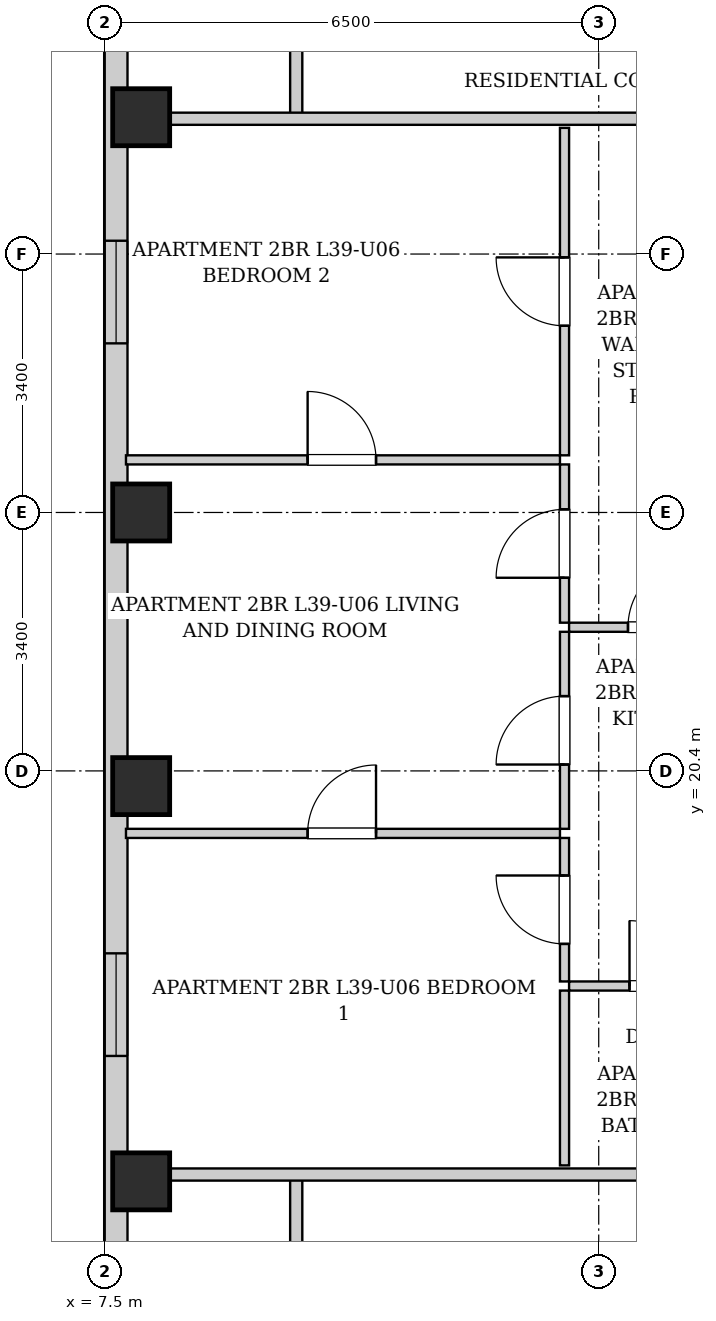
"""IFC4 building model, lengths in metres.
Left out: names, types, materials, properties, quantities, classifications, styles, units other than length and angle.
Written with IfcOpenShell. Run it as: python <this file> out.ifc"""

import sys

from ifc_helpers import new_model, si_unit, direction, frame, frame_2d, origin, origin_2d, place, context, subcontext, project, spatial, rectangle, extrude, element, fill, save


model = new_model("IFC4")
c1 = context("Model", 3, precision=1e-05, world=origin(), true_north=direction((0.0, 1.0)))
c2 = subcontext(c1, "Body", "Model", "MODEL_VIEW")
j1 = project(units=[si_unit("LENGTHUNIT", "METRE"), si_unit("PLANEANGLEUNIT", "RADIAN")], contexts=[c1])
p1 = place(None, origin())
s1 = spatial("IfcSite", under=j1, at=p1, CompositionType="ELEMENT")
p2 = place(p1, origin())
s2 = spatial("IfcBuilding", under=s1, at=p2, CompositionType="ELEMENT")
p3 = place(p2, frame((0.0, 0.0, 137.4)))
s3 = spatial("IfcBuildingStorey", under=s2, at=p3, CompositionType="ELEMENT", Elevation=137.4)
for number, where, z_axis, x_axis in (
    (1, (7.98, 15.0, 0.0), (0.0, 0.0, 1.0), (1.0, 0.0, 0.0)),
    (2, (7.98, 20.2, 0.0), (0.0, 0.0, 1.0), (1.0, 0.0, 0.0)),
    (3, (7.98, 23.8, 0.0), (0.0, 0.0, 1.0), (1.0, 0.0, 0.0)),
    (4, (7.98, 29.0, 0.0), (0.0, 0.0, 1.0), (1.0, 0.0, 0.0)),
):
    element("IfcColumn", number, at=place(p3, frame(where, z_axis=z_axis, x_axis=x_axis)), inside=s3, PredefinedType="COLUMN", context=c2, shape_type="SweptSolid", body=[
        extrude(rectangle(XDim=0.75, YDim=0.75, at=origin_2d()), origin(), (0.0, 0.0, 1.0), 3.25),
    ])
p4 = place(p3, frame((7.65, 6.3, 0.0), z_axis=(0.0, 0.0, 1.0), x_axis=(0.0, 1.0, 0.0)))
e5 = element("IfcWall", 5, at=p4, inside=s3, PredefinedType="SOLIDWALL", context=c2, shape_type="SweptSolid", body=[
    extrude(rectangle(XDim=34.5, YDim=0.3, at=frame_2d((17.25, 0.0))), origin(), (0.0, 0.0, 1.0), 2.99),
])
p5 = place(p4, frame((30.15, 0.0, 0.55)))
e6 = element("IfcOpeningElement", 6, at=p5, cuts=e5, PredefinedType="OPENING", context=c2, shape_type="SweptSolid", body=[
    extrude(rectangle(XDim=1.35, YDim=1.2, at=frame_2d((0.675, 0.6))), frame((0.0, 0.16, 0.0), z_axis=(0.0, -1.0, 0.0), x_axis=(1.0, 0.0, 0.0)), (0.0, 0.0, 1.0), 0.32),
])
p6 = place(p4, frame((28.235, 0.0, 0.55)))
e7 = element("IfcOpeningElement", 7, at=p6, cuts=e5, PredefinedType="OPENING", context=c2, shape_type="SweptSolid", body=[
    extrude(rectangle(XDim=1.35, YDim=1.2, at=frame_2d((0.675, 0.6))), frame((0.0, 0.16, 0.0), z_axis=(0.0, -1.0, 0.0), x_axis=(1.0, 0.0, 0.0)), (0.0, 0.0, 1.0), 0.32),
])
p7 = place(p4, frame((10.35, 0.0, 0.55)))
e8 = element("IfcOpeningElement", 8, at=p7, cuts=e5, PredefinedType="OPENING", context=c2, shape_type="SweptSolid", body=[
    extrude(rectangle(XDim=1.35, YDim=1.2, at=frame_2d((0.675, 0.6))), frame((0.0, 0.16, 0.0), z_axis=(0.0, -1.0, 0.0), x_axis=(1.0, 0.0, 0.0)), (0.0, 0.0, 1.0), 0.32),
])
p8 = place(p4, frame((19.725, 0.0, 0.55)))
e9 = element("IfcOpeningElement", 9, at=p8, cuts=e5, PredefinedType="OPENING", context=c2, shape_type="SweptSolid", body=[
    extrude(rectangle(XDim=1.35, YDim=1.2, at=frame_2d((0.675, 0.6))), frame((0.0, 0.16, 0.0), z_axis=(0.0, -1.0, 0.0), x_axis=(1.0, 0.0, 0.0)), (0.0, 0.0, 1.0), 0.32),
])
for number, where, z_axis, x_axis in (
    (10, (10.02, 13.35, 0.0), (0.0, 0.0, 1.0), (0.0, 1.0, 0.0)),
    (11, (10.02, 28.98, 0.0), (0.0, 0.0, 1.0), (0.0, 1.0, 0.0)),
):
    element("IfcWall", number, at=place(p3, frame(where, z_axis=z_axis, x_axis=x_axis)), inside=s3, PredefinedType="PARTITIONING", context=c2, shape_type="SweptSolid", body=[
        extrude(rectangle(XDim=1.74, YDim=0.16, at=frame_2d((0.87, 0.0))), origin(), (0.0, 0.0, 1.0), 2.99),
    ])
for number, where, z_axis, x_axis in (
    (12, (7.78, 15.09, 0.0), (0.0, 0.0, 1.0), (1.0, 0.0, 0.0)),
    (13, (7.78, 28.98, 0.0), (0.0, 0.0, 1.0), (1.0, 0.0, 0.0)),
):
    element("IfcWall", number, at=place(p3, frame(where, z_axis=z_axis, x_axis=x_axis)), inside=s3, PredefinedType="PARTITIONING", context=c2, shape_type="SweptSolid", body=[
        extrude(rectangle(XDim=8.36, YDim=0.16, at=frame_2d((4.18, 0.0))), origin(), (0.0, 0.0, 1.0), 2.426),
    ])
p9 = place(p3, frame((13.61, 22.29, 0.0), z_axis=(0.0, 0.0, 1.0), x_axis=(1.0, 0.0, 0.0)))
e14 = element("IfcWall", 14, at=p9, inside=s3, PredefinedType="PARTITIONING", context=c2, shape_type="SweptSolid", body=[
    extrude(rectangle(XDim=2.45, YDim=0.12, at=frame_2d((1.225, 0.0))), origin(), (0.0, 0.0, 1.0), 2.99),
])
p10 = place(p9, frame((0.775, 0.0, 0.0)))
e15 = element("IfcOpeningElement", 15, at=p10, cuts=e14, PredefinedType="OPENING", context=c2, shape_type="SweptSolid", body=[
    extrude(rectangle(XDim=0.9, YDim=2.05, at=frame_2d((0.45, 1.025))), frame((0.0, 0.07, 0.0), z_axis=(0.0, -1.0, 0.0), x_axis=(1.0, 0.0, 0.0)), (0.0, 0.0, 1.0), 0.14),
])
p11 = place(p3, frame((13.55, 22.35, 0.0), z_axis=(0.0, 0.0, 1.0), x_axis=(0.0, 1.0, 0.0)))
e16 = element("IfcWall", 16, at=p11, inside=s3, PredefinedType="PARTITIONING", context=c2, shape_type="SweptSolid", body=[
    extrude(rectangle(XDim=2.082, YDim=0.12, at=frame_2d((1.041, 0.0))), origin(), (0.0, 0.0, 1.0), 2.99),
])
p12 = place(p11, frame((0.591, 0.0, 0.0)))
e17 = element("IfcOpeningElement", 17, at=p12, cuts=e16, PredefinedType="OPENING", context=c2, shape_type="SweptSolid", body=[
    extrude(rectangle(XDim=0.9, YDim=2.05, at=frame_2d((0.45, 1.025))), frame((0.0, 0.07, 0.0), z_axis=(0.0, -1.0, 0.0), x_axis=(1.0, 0.0, 0.0)), (0.0, 0.0, 1.0), 0.14),
])
p13 = place(p3, frame((13.55, 24.552, 0.0), z_axis=(0.0, 0.0, 1.0), x_axis=(0.0, 1.0, 0.0)))
e18 = element("IfcWall", 18, at=p13, inside=s3, PredefinedType="PARTITIONING", context=c2, shape_type="SweptSolid", body=[
    extrude(rectangle(XDim=4.308, YDim=0.12, at=frame_2d((2.154, 0.0))), origin(), (0.0, 0.0, 1.0), 2.99),
])
p14 = place(p13, frame((1.704, 0.0, 0.0)))
e19 = element("IfcOpeningElement", 19, at=p14, cuts=e18, PredefinedType="OPENING", context=c2, shape_type="SweptSolid", body=[
    extrude(rectangle(XDim=0.9, YDim=2.05, at=frame_2d((0.45, 1.025))), frame((0.0, 0.07, 0.0), z_axis=(0.0, -1.0, 0.0), x_axis=(1.0, 0.0, 0.0)), (0.0, 0.0, 1.0), 0.14),
])
p15 = place(p3, frame((13.61, 17.57, 0.0), z_axis=(0.0, 0.0, 1.0), x_axis=(1.0, 0.0, 0.0)))
e20 = element("IfcWall", 20, at=p15, inside=s3, PredefinedType="PARTITIONING", context=c2, shape_type="SweptSolid", body=[
    extrude(rectangle(XDim=2.45, YDim=0.12, at=frame_2d((1.225, 0.0))), origin(), (0.0, 0.0, 1.0), 2.99),
])
p16 = place(p15, frame((0.795, 0.0, 0.0)))
e21 = element("IfcOpeningElement", 21, at=p16, cuts=e20, PredefinedType="OPENING", context=c2, shape_type="SweptSolid", body=[
    extrude(rectangle(XDim=0.86, YDim=2.05, at=frame_2d((0.43, 1.025))), frame((0.0, 0.07, 0.0), z_axis=(0.0, -1.0, 0.0), x_axis=(1.0, 0.0, 0.0)), (0.0, 0.0, 1.0), 0.14),
])
p17 = place(p3, frame((13.55, 15.21, 0.0), z_axis=(0.0, 0.0, 1.0), x_axis=(0.0, 1.0, 0.0)))
e22 = element("IfcWall", 22, at=p17, inside=s3, PredefinedType="PARTITIONING", context=c2, shape_type="SweptSolid", body=[
    extrude(rectangle(XDim=2.3, YDim=0.12, at=frame_2d((1.15, 0.0))), origin(), (0.0, 0.0, 1.0), 2.99),
])
p18 = place(p3, frame((13.55, 17.63, 0.0), z_axis=(0.0, 0.0, 1.0), x_axis=(0.0, 1.0, 0.0)))
e23 = element("IfcWall", 23, at=p18, inside=s3, PredefinedType="PARTITIONING", context=c2, shape_type="SweptSolid", body=[
    extrude(rectangle(XDim=1.888, YDim=0.12, at=frame_2d((0.944, 0.0))), origin(), (0.0, 0.0, 1.0), 2.99),
])
p19 = place(p18, frame((0.494, 0.0, 0.0)))
e24 = element("IfcOpeningElement", 24, at=p19, cuts=e23, PredefinedType="OPENING", context=c2, shape_type="SweptSolid", body=[
    extrude(rectangle(XDim=0.9, YDim=2.05, at=frame_2d((0.45, 1.025))), frame((0.0, 0.07, 0.0), z_axis=(0.0, -1.0, 0.0), x_axis=(1.0, 0.0, 0.0)), (0.0, 0.0, 1.0), 0.14),
])
p20 = place(p3, frame((13.55, 19.638, 0.0), z_axis=(0.0, 0.0, 1.0), x_axis=(0.0, 1.0, 0.0)))
e25 = element("IfcWall", 25, at=p20, inside=s3, PredefinedType="PARTITIONING", context=c2, shape_type="SweptSolid", body=[
    extrude(rectangle(XDim=2.592, YDim=0.12, at=frame_2d((1.296, 0.0))), origin(), (0.0, 0.0, 1.0), 2.99),
])
p21 = place(p20, frame((0.846, 0.0, 0.0)))
e26 = element("IfcOpeningElement", 26, at=p21, cuts=e25, PredefinedType="OPENING", context=c2, shape_type="SweptSolid", body=[
    extrude(rectangle(XDim=0.9, YDim=2.05, at=frame_2d((0.45, 1.025))), frame((0.0, 0.07, 0.0), z_axis=(0.0, -1.0, 0.0), x_axis=(1.0, 0.0, 0.0)), (0.0, 0.0, 1.0), 0.14),
])
p22 = place(p3, frame((7.78, 19.578, 0.0), z_axis=(0.0, 0.0, 1.0), x_axis=(1.0, 0.0, 0.0)))
e27 = element("IfcWall", 27, at=p22, inside=s3, PredefinedType="PARTITIONING", context=c2, shape_type="SweptSolid", body=[
    extrude(rectangle(XDim=5.71, YDim=0.12, at=frame_2d((2.855, 0.0))), origin(), (0.0, 0.0, 1.0), 2.99),
])
p23 = place(p22, frame((2.39, 0.0, 0.0)))
e28 = element("IfcOpeningElement", 28, at=p23, cuts=e27, PredefinedType="OPENING", context=c2, shape_type="SweptSolid", body=[
    extrude(rectangle(XDim=0.9, YDim=2.05, at=frame_2d((0.45, 1.025))), frame((0.0, 0.07, 0.0), z_axis=(0.0, -1.0, 0.0), x_axis=(1.0, 0.0, 0.0)), (0.0, 0.0, 1.0), 0.14),
])
p24 = place(p3, frame((7.78, 24.492, 0.0), z_axis=(0.0, 0.0, 1.0), x_axis=(1.0, 0.0, 0.0)))
e29 = element("IfcWall", 29, at=p24, inside=s3, PredefinedType="PARTITIONING", context=c2, shape_type="SweptSolid", body=[
    extrude(rectangle(XDim=5.71, YDim=0.12, at=frame_2d((2.855, 0.0))), origin(), (0.0, 0.0, 1.0), 2.621),
])
p25 = place(p24, frame((2.39, 0.0, 0.0)))
e30 = element("IfcOpeningElement", 30, at=p25, cuts=e29, PredefinedType="OPENING", context=c2, shape_type="SweptSolid", body=[
    extrude(rectangle(XDim=0.9, YDim=2.05, at=frame_2d((0.45, 1.025))), frame((0.0, 0.07, 0.0), z_axis=(0.0, -1.0, 0.0), x_axis=(1.0, 0.0, 0.0)), (0.0, 0.0, 1.0), 0.14),
])
p26 = place(p10, origin())
e31 = element("IfcDoor", 31, at=p26, inside=s3, OperationType="SINGLE_SWING_RIGHT", PredefinedType="DOOR", context=c2, shape_type="SweptSolid", body=[
    extrude(rectangle(XDim=0.9, YDim=2.05, at=frame_2d((0.45, 1.025))), frame((0.0, 0.025, 0.0), z_axis=(0.0, -1.0, 0.0), x_axis=(1.0, 0.0, 0.0)), (0.0, 0.0, 1.0), 0.05),
])
fill(e15, e31)
p27 = place(p12, origin())
e32 = element("IfcDoor", 32, at=p27, inside=s3, OperationType="SINGLE_SWING_LEFT", PredefinedType="DOOR", context=c2, shape_type="SweptSolid", body=[
    extrude(rectangle(XDim=0.9, YDim=2.05, at=frame_2d((0.45, 1.025))), frame((0.0, 0.025, 0.0), z_axis=(0.0, -1.0, 0.0), x_axis=(1.0, 0.0, 0.0)), (0.0, 0.0, 1.0), 0.05),
])
fill(e17, e32)
p28 = place(p14, origin())
e33 = element("IfcDoor", 33, at=p28, inside=s3, OperationType="SINGLE_SWING_RIGHT", PredefinedType="DOOR", context=c2, shape_type="SweptSolid", body=[
    extrude(rectangle(XDim=0.9, YDim=2.05, at=frame_2d((0.45, 1.025))), frame((0.0, 0.025, 0.0), z_axis=(0.0, -1.0, 0.0), x_axis=(1.0, 0.0, 0.0)), (0.0, 0.0, 1.0), 0.05),
])
fill(e19, e33)
p29 = place(p16, origin())
e34 = element("IfcDoor", 34, at=p29, inside=s3, OperationType="SINGLE_SWING_LEFT", PredefinedType="DOOR", context=c2, shape_type="SweptSolid", body=[
    extrude(rectangle(XDim=0.86, YDim=2.05, at=frame_2d((0.43, 1.025))), frame((0.0, 0.025, 0.0), z_axis=(0.0, -1.0, 0.0), x_axis=(1.0, 0.0, 0.0)), (0.0, 0.0, 1.0), 0.05),
])
fill(e21, e34)
p30 = place(p19, origin())
e35 = element("IfcDoor", 35, at=p30, inside=s3, OperationType="SINGLE_SWING_RIGHT", PredefinedType="DOOR", context=c2, shape_type="SweptSolid", body=[
    extrude(rectangle(XDim=0.9, YDim=2.05, at=frame_2d((0.45, 1.025))), frame((0.0, 0.025, 0.0), z_axis=(0.0, -1.0, 0.0), x_axis=(1.0, 0.0, 0.0)), (0.0, 0.0, 1.0), 0.05),
])
fill(e24, e35)
p31 = place(p21, origin())
e36 = element("IfcDoor", 36, at=p31, inside=s3, OperationType="SINGLE_SWING_LEFT", PredefinedType="DOOR", context=c2, shape_type="SweptSolid", body=[
    extrude(rectangle(XDim=0.9, YDim=2.05, at=frame_2d((0.45, 1.025))), frame((0.0, 0.025, 0.0), z_axis=(0.0, -1.0, 0.0), x_axis=(1.0, 0.0, 0.0)), (0.0, 0.0, 1.0), 0.05),
])
fill(e26, e36)
p32 = place(p23, origin())
e37 = element("IfcDoor", 37, at=p32, inside=s3, OperationType="SINGLE_SWING_RIGHT", PredefinedType="DOOR", context=c2, shape_type="SweptSolid", body=[
    extrude(rectangle(XDim=0.9, YDim=2.05, at=frame_2d((0.45, 1.025))), frame((0.0, 0.025, 0.0), z_axis=(0.0, -1.0, 0.0), x_axis=(1.0, 0.0, 0.0)), (0.0, 0.0, 1.0), 0.05),
])
fill(e28, e37)
p33 = place(p25, origin())
e38 = element("IfcDoor", 38, at=p33, inside=s3, OperationType="SINGLE_SWING_LEFT", PredefinedType="DOOR", context=c2, shape_type="SweptSolid", body=[
    extrude(rectangle(XDim=0.9, YDim=2.05, at=frame_2d((0.45, 1.025))), frame((0.0, 0.025, 0.0), z_axis=(0.0, -1.0, 0.0), x_axis=(1.0, 0.0, 0.0)), (0.0, 0.0, 1.0), 0.05),
])
fill(e30, e38)
p34 = place(p7, origin())
e39 = element("IfcWindow", 39, at=p34, inside=s3, PartitioningType="SINGLE_PANEL", PredefinedType="WINDOW", context=c2, shape_type="SweptSolid", body=[
    extrude(rectangle(XDim=1.35, YDim=1.2, at=frame_2d((0.675, 0.6))), frame((0.0, 0.03, 0.0), z_axis=(0.0, -1.0, 0.0), x_axis=(1.0, 0.0, 0.0)), (0.0, 0.0, 1.0), 0.06),
])
fill(e8, e39)
p35 = place(p8, origin())
e40 = element("IfcWindow", 40, at=p35, inside=s3, PartitioningType="SINGLE_PANEL", PredefinedType="WINDOW", context=c2, shape_type="SweptSolid", body=[
    extrude(rectangle(XDim=1.35, YDim=1.2, at=frame_2d((0.675, 0.6))), frame((0.0, 0.03, 0.0), z_axis=(0.0, -1.0, 0.0), x_axis=(1.0, 0.0, 0.0)), (0.0, 0.0, 1.0), 0.06),
])
fill(e9, e40)
save(model, sys.argv[1])
